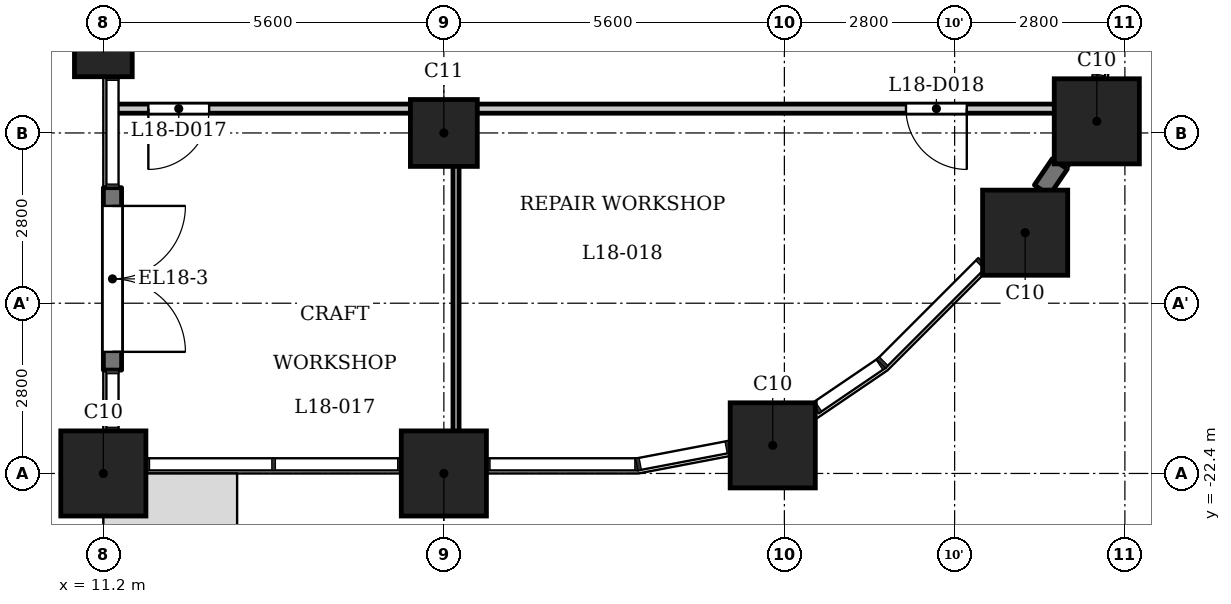
"""IFC4 building model, lengths in metres.
Left out: names, types, materials, properties, quantities, classifications, styles, units other than length and angle.
Written with IfcOpenShell. Run it as: python <this file> out.ifc"""

import sys

from ifc_helpers import new_model, si_unit, direction, frame, frame_2d, origin, origin_2d, place, context, subcontext, project, spatial, rectangle, extrude, element, fill, save


model = new_model("IFC4")
c1 = context("Model", 3, precision=1e-05, world=origin(), true_north=direction((0.0, 1.0)))
c2 = subcontext(c1, "Body", "Model", "MODEL_VIEW")
j1 = project(units=[si_unit("LENGTHUNIT", "METRE"), si_unit("PLANEANGLEUNIT", "RADIAN")], contexts=[c1])
p1 = place(None, origin())
s1 = spatial("IfcSite", under=j1, at=p1, CompositionType="ELEMENT")
p2 = place(p1, origin())
s2 = spatial("IfcBuilding", under=s1, at=p2, CompositionType="ELEMENT")
p3 = place(p2, frame((0.0, 0.0, 72.5)))
s3 = spatial("IfcBuildingStorey", under=s2, at=p3, CompositionType="ELEMENT", Elevation=72.5)
for number, where, z_axis, x_axis in (
    (1, (11.2, -22.4, 0.0), (0.0, 0.0, 1.0), (1.0, 0.0, 0.0)),
    (2, (16.8, -22.4, 0.0), (0.0, 0.0, 1.0), (1.0, 0.0, 0.0)),
    (3, (22.209, -21.938, 0.0), (0.0, 0.0, 1.0), (1.0, 0.0, 0.0)),
    (4, (26.36, -18.44, 0.0), (0.0, 0.0, 1.0), (1.0, 0.0, 0.0)),
    (5, (27.538, -16.609, 0.0), (0.0, 0.0, 1.0), (1.0, 0.0, 0.0)),
):
    element("IfcColumn", number, at=place(p3, frame(where, z_axis=z_axis, x_axis=x_axis)), inside=s3, PredefinedType="COLUMN", context=c2, shape_type="SweptSolid", body=[
        extrude(rectangle(XDim=1.4, YDim=1.4, at=origin_2d()), origin(), (0.0, 0.0, 1.0), 5.4),
    ])
p4 = place(p3, frame((16.8, -16.8, 0.0), z_axis=(0.0, 0.0, 1.0), x_axis=(1.0, 0.0, 0.0)))
e6 = element("IfcColumn", 6, at=p4, inside=s3, PredefinedType="COLUMN", context=c2, shape_type="SweptSolid", body=[
    extrude(rectangle(XDim=1.1, YDim=1.1, at=origin_2d()), origin(), (0.0, 0.0, 1.0), 5.4),
])
p5 = place(p3, frame((11.2, -15.4, 0.0), z_axis=(0.0, 0.0, 1.0), x_axis=(1.0, 0.0, 0.0)))
e7 = element("IfcColumn", 7, at=p5, inside=s3, PredefinedType="COLUMN", context=c2, shape_type="SweptSolid", body=[
    extrude(rectangle(XDim=0.95, YDim=0.95, at=origin_2d()), origin(), (0.0, 0.0, 1.0), 5.4),
])
p6 = place(p3, frame((11.35, -17.7, 0.0), z_axis=(0.0, 0.0, 1.0), x_axis=(0.0, -1.0, 0.0)))
e8 = element("IfcWall", 8, at=p6, inside=s3, PredefinedType="SOLIDWALL", context=c2, shape_type="SweptSolid", body=[
    extrude(rectangle(XDim=3.0, YDim=0.3, at=frame_2d((1.5, 0.0))), origin(), (0.0, 0.0, 1.0), 4.95),
])
p7 = place(p6, frame((0.3, 0.0, 0.0)))
e9 = element("IfcOpeningElement", 9, at=p7, cuts=e8, PredefinedType="OPENING", context=c2, shape_type="SweptSolid", body=[
    extrude(rectangle(XDim=2.4, YDim=2.3, at=frame_2d((1.2, 1.15))), frame((0.0, 0.16, 0.0), z_axis=(0.0, -1.0, 0.0), x_axis=(1.0, 0.0, 0.0)), (0.0, 0.0, 1.0), 0.32),
])
p8 = place(p3, frame((26.636, -17.74, 0.0), z_axis=(0.0, 0.0, 1.0), x_axis=(0.561913238827, 0.827196175059, 0.0)))
e10 = element("IfcWall", 10, at=p8, inside=s3, PredefinedType="SOLIDWALL", context=c2, shape_type="SweptSolid", body=[
    extrude(rectangle(XDim=0.522, YDim=0.3, at=frame_2d((0.261, 0.0))), origin(), (0.0, 0.0, 1.0), 4.95),
])
p9 = place(p3, frame((11.384, -16.4, 0.0), z_axis=(0.0, 0.0, 1.0), x_axis=(1.0, 0.0, 0.0)))
e11 = element("IfcWall", 11, at=p9, inside=s3, PredefinedType="PARTITIONING", context=c2, shape_type="SweptSolid", body=[
    extrude(rectangle(XDim=16.136, YDim=0.15, at=frame_2d((8.068, 0.0))), origin(), (0.0, 0.0, 1.0), 4.95),
])
p10 = place(p9, frame((0.556, 0.0, 0.0)))
e12 = element("IfcOpeningElement", 12, at=p10, cuts=e11, PredefinedType="OPENING", context=c2, shape_type="SweptSolid", body=[
    extrude(rectangle(XDim=1.0, YDim=2.1, at=frame_2d((0.5, 1.05))), frame((0.0, 0.085, 0.0), z_axis=(0.0, -1.0, 0.0), x_axis=(1.0, 0.0, 0.0)), (0.0, 0.0, 1.0), 0.17),
])
p11 = place(p9, frame((13.016, 0.0, 0.0)))
e13 = element("IfcOpeningElement", 13, at=p11, cuts=e11, PredefinedType="OPENING", context=c2, shape_type="SweptSolid", body=[
    extrude(rectangle(XDim=1.0, YDim=2.1, at=frame_2d((0.5, 1.05))), frame((0.0, 0.085, 0.0), z_axis=(0.0, -1.0, 0.0), x_axis=(1.0, 0.0, 0.0)), (0.0, 0.0, 1.0), 0.17),
])
p12 = place(p3, frame((17.0, -23.08, 0.0), z_axis=(0.0, 0.0, 1.0), x_axis=(0.0, 1.0, 0.0)))
e14 = element("IfcWall", 14, at=p12, inside=s3, PredefinedType="PARTITIONING", context=c2, shape_type="SweptSolid", body=[
    extrude(rectangle(XDim=6.605, YDim=0.1, at=frame_2d((3.302, 0.0))), origin(), (0.0, 0.0, 1.0), 4.95),
])
p13 = place(p7, origin())
e15 = element("IfcDoor", 15, at=p13, inside=s3, OperationType="SINGLE_SWING_LEFT", PredefinedType="DOOR", context=c2, shape_type="SweptSolid", body=[
    extrude(rectangle(XDim=2.4, YDim=2.3, at=frame_2d((1.2, 1.15))), frame((0.0, 0.025, 0.0), z_axis=(0.0, -1.0, 0.0), x_axis=(1.0, 0.0, 0.0)), (0.0, 0.0, 1.0), 0.05),
])
fill(e9, e15)
p14 = place(p10, origin())
e16 = element("IfcDoor", 16, at=p14, inside=s3, OperationType="SINGLE_SWING_LEFT", PredefinedType="DOOR", context=c2, shape_type="SweptSolid", body=[
    extrude(rectangle(XDim=1.0, YDim=2.1, at=frame_2d((0.5, 1.05))), frame((0.0, 0.025, 0.0), z_axis=(0.0, -1.0, 0.0), x_axis=(1.0, 0.0, 0.0)), (0.0, 0.0, 1.0), 0.05),
])
fill(e12, e16)
p15 = place(p11, origin())
e17 = element("IfcDoor", 17, at=p15, inside=s3, OperationType="SINGLE_SWING_RIGHT", PredefinedType="DOOR", context=c2, shape_type="SweptSolid", body=[
    extrude(rectangle(XDim=1.0, YDim=2.1, at=frame_2d((0.5, 1.05))), frame((0.0, 0.025, 0.0), z_axis=(0.0, -1.0, 0.0), x_axis=(1.0, 0.0, 0.0)), (0.0, 0.0, 1.0), 0.05),
])
fill(e13, e17)
save(model, sys.argv[1])
